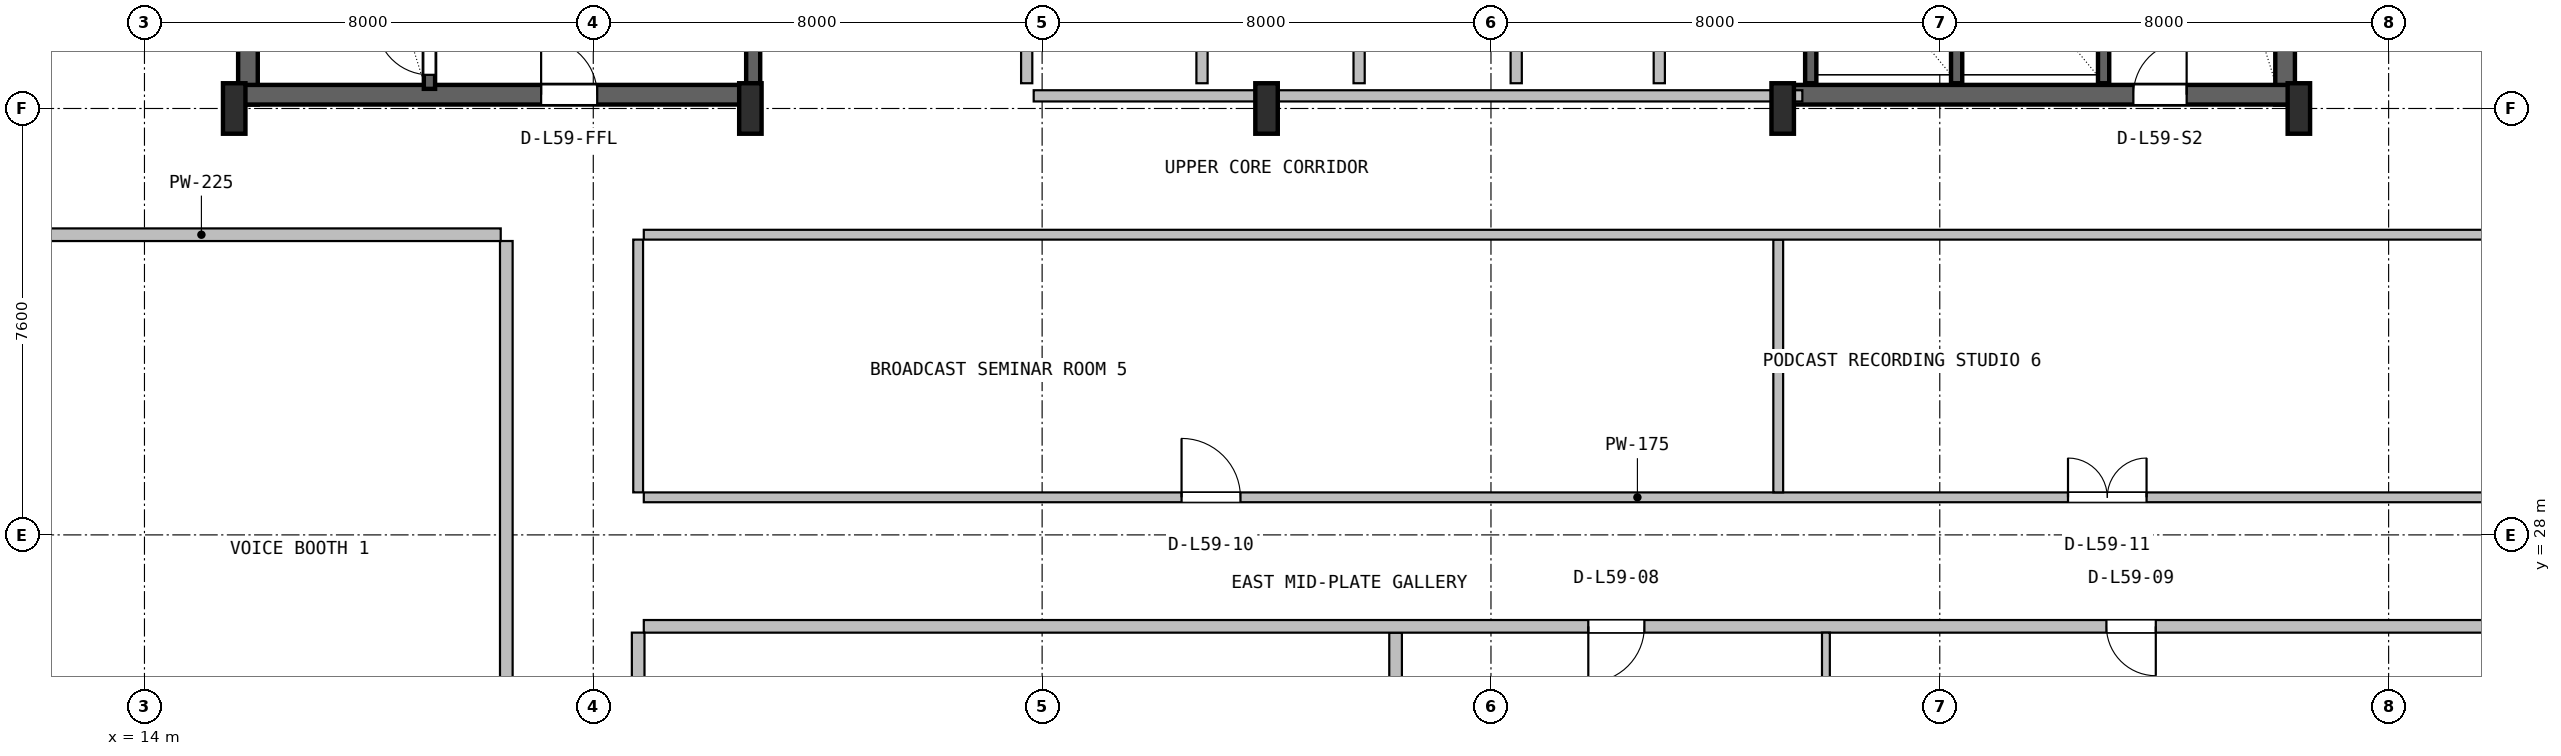
"""IFC4 building model, lengths in metres.
Left out: names, types, materials, properties, quantities, classifications, styles, units other than length and angle.
Written with IfcOpenShell. Run it as: python <this file> out.ifc"""

import sys

from ifc_helpers import new_model, si_unit, direction, frame, frame_2d, origin, origin_2d, place, context, subcontext, project, spatial, rectangle, i_section, extrude, source, transform, mapped, element, fill, save


model = new_model("IFC4")
c1 = context("Model", 3, precision=1e-05, world=origin(), true_north=direction((0.0, 1.0)))
c2 = subcontext(c1, "Body", "Model", "MODEL_VIEW")
j1 = project(units=[si_unit("LENGTHUNIT", "METRE"), si_unit("PLANEANGLEUNIT", "RADIAN")], contexts=[c1])
p1 = place(None, origin())
s1 = spatial("IfcSite", under=j1, at=p1, CompositionType="ELEMENT")
p2 = place(p1, origin())
s2 = spatial("IfcBuilding", under=s1, at=p2, CompositionType="ELEMENT")
p3 = place(p2, frame((0.0, 0.0, 239.4)))
s3 = spatial("IfcBuildingStorey", under=s2, at=p3, CompositionType="ELEMENT", Elevation=239.4)
for number, where, z_axis, x_axis in (
    (1, (15.845, 35.67, 0.0), (0.0, 0.0, 1.0), (0.0, 1.0, 0.0)),
    (2, (52.155, 35.67, 0.0), (0.0, 0.0, 1.0), (0.0, 1.0, 0.0)),
):
    element("IfcWall", number, at=place(p3, frame(where, z_axis=z_axis, x_axis=x_axis)), inside=s3, PredefinedType="SHEAR", context=c2, shape_type="SweptSolid", body=[
        extrude(rectangle(XDim=11.13, YDim=0.35, at=frame_2d((5.565, 0.0))), origin(), (0.0, 0.0, 1.0), 3.55),
    ])
p4 = place(p3, frame((15.67, 35.845, 0.0), z_axis=(0.0, 0.0, 1.0), x_axis=(1.0, 0.0, 0.0)))
e3 = element("IfcWall", 3, at=p4, inside=s3, PredefinedType="SHEAR", context=c2, shape_type="SweptSolid", body=[
    extrude(rectangle(XDim=9.13, YDim=0.35, at=frame_2d((4.565, 0.0))), origin(), (0.0, 0.0, 1.0), 3.55),
])
p5 = place(p4, frame((5.4, 0.0, 0.0)))
e4 = element("IfcOpeningElement", 4, at=p5, cuts=e3, PredefinedType="OPENING", context=c2, shape_type="SweptSolid", body=[
    extrude(rectangle(XDim=1.0, YDim=2.1, at=frame_2d((0.5, 1.05))), frame((0.0, 0.185, 0.0), z_axis=(0.0, -1.0, 0.0), x_axis=(1.0, 0.0, 0.0)), (0.0, 0.0, 1.0), 0.37),
])
p6 = place(p3, frame((43.2, 35.845, 0.0), z_axis=(0.0, 0.0, 1.0), x_axis=(1.0, 0.0, 0.0)))
e5 = element("IfcWall", 5, at=p6, inside=s3, PredefinedType="SHEAR", context=c2, shape_type="SweptSolid", body=[
    extrude(rectangle(XDim=9.13, YDim=0.35, at=frame_2d((4.565, 0.0))), origin(), (0.0, 0.0, 1.0), 3.55),
])
p7 = place(p6, frame((6.25, 0.0, 0.0)))
e6 = element("IfcOpeningElement", 6, at=p7, cuts=e5, PredefinedType="OPENING", context=c2, shape_type="SweptSolid", body=[
    extrude(rectangle(XDim=0.95, YDim=2.1, at=frame_2d((0.475, 1.05))), frame((0.0, 0.185, 0.0), z_axis=(0.0, -1.0, 0.0), x_axis=(1.0, 0.0, 0.0)), (0.0, 0.0, 1.0), 0.37),
])
m1 = source(origin(), c2, "Body", "SweptSolid", [
    extrude(i_section(OverallWidth=0.4, OverallDepth=0.9, WebThickness=0.016, FlangeThickness=0.028, FilletRadius=0.016, at=origin_2d()), origin(), (0.0, 0.0, 1.0), 3.8),
])
for number, where, z_axis, x_axis in (
    (7, (15.6, 35.6, 0.0), (0.0, 0.0, 1.0), (1.0, 0.0, 0.0)),
    (8, (24.8, 35.6, 0.0), (0.0, 0.0, 1.0), (1.0, 0.0, 0.0)),
    (9, (34.0, 35.6, 0.0), (0.0, 0.0, 1.0), (1.0, 0.0, 0.0)),
    (10, (43.2, 35.6, 0.0), (0.0, 0.0, 1.0), (1.0, 0.0, 0.0)),
    (11, (52.4, 35.6, 0.0), (0.0, 0.0, 1.0), (1.0, 0.0, 0.0)),
):
    element("IfcColumn", number, at=place(p3, frame(where, z_axis=z_axis, x_axis=x_axis)), inside=s3, PredefinedType="COLUMN", context=c2, shape_type="MappedRepresentation", body=[
        mapped(m1, transform((0.0, 0.0, 0.0), x_axis=(1.0, 0.0, 0.0), y_axis=(0.0, 1.0, 0.0), z_axis=(0.0, 0.0, 1.0), scale=1.0)),
    ])
p8 = place(p3, frame((19.08, 35.95, 0.0), z_axis=(0.0, 0.0, 1.0), x_axis=(0.0, 1.0, 0.0)))
e12 = element("IfcWall", 12, at=p8, inside=s3, PredefinedType="SHEAR", context=c2, shape_type="SweptSolid", body=[
    extrude(rectangle(XDim=9.65, YDim=0.2, at=frame_2d((4.825, 0.0))), origin(), (0.0, 0.0, 1.0), 3.55),
])
p9 = place(p8, frame((0.25, 0.0, 0.0)))
e13 = element("IfcOpeningElement", 13, at=p9, cuts=e12, PredefinedType="OPENING", context=c2, shape_type="SweptSolid", body=[
    extrude(rectangle(XDim=0.95, YDim=2.1, at=frame_2d((0.475, 1.05))), frame((0.0, 0.11, 0.0), z_axis=(0.0, -1.0, 0.0), x_axis=(1.0, 0.0, 0.0)), (0.0, 0.0, 1.0), 0.22),
])
p10 = place(p3, frame((24.85, 36.05, 0.0), z_axis=(0.0, 0.0, 1.0), x_axis=(0.0, 1.0, 0.0)))
e14 = element("IfcWall", 14, at=p10, inside=s3, PredefinedType="SHEAR", context=c2, shape_type="SweptSolid", body=[
    extrude(rectangle(XDim=10.45, YDim=0.25, at=frame_2d((5.225, 0.0))), origin(), (0.0, 0.0, 1.0), 3.55),
])
p11 = place(p3, frame((48.92, 36.05, 0.0), z_axis=(0.0, 0.0, 1.0), x_axis=(0.0, 1.0, 0.0)))
e15 = element("IfcWall", 15, at=p11, inside=s3, PredefinedType="SHEAR", context=c2, shape_type="SweptSolid", body=[
    extrude(rectangle(XDim=10.5, YDim=0.2, at=frame_2d((5.25, 0.0))), origin(), (0.0, 0.0, 1.0), 3.55),
])
for number, where, z_axis, x_axis in (
    (16, (43.7, 36.05, 0.0), (0.0, 0.0, 1.0), (0.0, 1.0, 0.0)),
    (17, (46.3, 36.05, 0.0), (0.0, 0.0, 1.0), (0.0, 1.0, 0.0)),
):
    element("IfcWall", number, at=place(p3, frame(where, z_axis=z_axis, x_axis=x_axis)), inside=s3, PredefinedType="SHEAR", context=c2, shape_type="SweptSolid", body=[
        extrude(rectangle(XDim=3.05, YDim=0.2, at=frame_2d((1.525, 0.0))), origin(), (0.0, 0.0, 1.0), 3.55),
    ])
p12 = place(p3, frame((29.85, 35.825, 0.0), z_axis=(0.0, 0.0, 1.0), x_axis=(1.0, 0.0, 0.0)))
e18 = element("IfcWall", 18, at=p12, inside=s3, PredefinedType="SOLIDWALL", context=c2, shape_type="SweptSolid", body=[
    extrude(rectangle(XDim=13.7, YDim=0.2, at=frame_2d((6.85, 0.0))), origin(), (0.0, 0.0, 1.0), 2.575),
])
for number, where, z_axis, x_axis in (
    (19, (32.85, 36.05, 0.0), (0.0, 0.0, 1.0), (0.0, 1.0, 0.0)),
    (20, (29.725, 36.05, 0.0), (0.0, 0.0, 1.0), (0.0, 1.0, 0.0)),
    (21, (35.65, 36.05, 0.0), (0.0, 0.0, 1.0), (0.0, 1.0, 0.0)),
    (22, (38.45, 36.05, 0.0), (0.0, 0.0, 1.0), (0.0, 1.0, 0.0)),
):
    element("IfcWall", number, at=place(p3, frame(where, z_axis=z_axis, x_axis=x_axis)), inside=s3, PredefinedType="PLUMBINGWALL", context=c2, shape_type="SweptSolid", body=[
        extrude(rectangle(XDim=3.1, YDim=0.2, at=frame_2d((1.55, 0.0))), origin(), (0.0, 0.0, 1.0), 3.53),
    ])
p13 = place(p3, frame((41.0, 36.05, 0.0), z_axis=(0.0, 0.0, 1.0), x_axis=(0.0, 1.0, 0.0)))
e23 = element("IfcWall", 23, at=p13, inside=s3, PredefinedType="SOLIDWALL", context=c2, shape_type="SweptSolid", body=[
    extrude(rectangle(XDim=3.1, YDim=0.2, at=frame_2d((1.55, 0.0))), origin(), (0.0, 0.0, 1.0), 3.53),
])
p14 = place(p3, frame((20.45, 10.38, 0.0), z_axis=(0.0, 0.0, 1.0), x_axis=(0.0, 1.0, 0.0)))
e24 = element("IfcWall", 24, at=p14, inside=s3, PredefinedType="PARTITIONING", context=c2, shape_type="SweptSolid", body=[
    extrude(rectangle(XDim=22.858, YDim=0.225, at=frame_2d((11.429, 0.0))), origin(), (0.0, 0.0, 1.0), 3.171),
])
p15 = place(p14, frame((11.184, 0.0, 0.0)))
e25 = element("IfcOpeningElement", 25, at=p15, cuts=e24, PredefinedType="OPENING", context=c2, shape_type="SweptSolid", body=[
    extrude(rectangle(XDim=1.4, YDim=2.12, at=frame_2d((0.7, 1.06))), frame((0.0, 0.123, 0.0), z_axis=(0.0, -1.0, 0.0), x_axis=(1.0, 0.0, 0.0)), (0.0, 0.0, 1.0), 0.245),
])
p16 = place(p3, frame((9.68, 33.35, 0.0), z_axis=(0.0, 0.0, 1.0), x_axis=(1.0, 0.0, 0.0)))
e26 = element("IfcWall", 26, at=p16, inside=s3, PredefinedType="PARTITIONING", context=c2, shape_type="SweptSolid", body=[
    extrude(rectangle(XDim=10.67, YDim=0.225, at=frame_2d((5.335, 0.0))), origin(), (0.0, 0.0, 1.0), 3.171),
])
p17 = place(p3, frame((36.3, 10.38, 0.0), z_axis=(0.0, 0.0, 1.0), x_axis=(0.0, 1.0, 0.0)))
e27 = element("IfcWall", 27, at=p17, inside=s3, PredefinedType="PARTITIONING", context=c2, shape_type="SweptSolid", body=[
    extrude(rectangle(XDim=15.878, YDim=0.225, at=frame_2d((7.939, 0.0))), origin(), (0.0, 0.0, 1.0), 2.908),
])
p18 = place(p3, frame((22.9, 26.37, 0.0), z_axis=(0.0, 0.0, 1.0), x_axis=(1.0, 0.0, 0.0)))
e28 = element("IfcWall", 28, at=p18, inside=s3, PredefinedType="PARTITIONING", context=c2, shape_type="SweptSolid", body=[
    extrude(rectangle(XDim=35.42, YDim=0.225, at=frame_2d((17.71, 0.0))), origin(), (0.0, 0.0, 1.0), 2.908),
])
p19 = place(p18, frame((16.835, 0.0, 0.0)))
e29 = element("IfcOpeningElement", 29, at=p19, cuts=e28, PredefinedType="OPENING", context=c2, shape_type="SweptSolid", body=[
    extrude(rectangle(XDim=1.0, YDim=2.1, at=frame_2d((0.5, 1.05))), frame((0.0, 0.123, 0.0), z_axis=(0.0, -1.0, 0.0), x_axis=(1.0, 0.0, 0.0)), (0.0, 0.0, 1.0), 0.245),
])
p20 = place(p18, frame((26.07, 0.0, 0.0)))
e30 = element("IfcOpeningElement", 30, at=p20, cuts=e28, PredefinedType="OPENING", context=c2, shape_type="SweptSolid", body=[
    extrude(rectangle(XDim=0.88, YDim=2.06, at=frame_2d((0.44, 1.03))), frame((0.0, 0.123, 0.0), z_axis=(0.0, -1.0, 0.0), x_axis=(1.0, 0.0, 0.0)), (0.0, 0.0, 1.0), 0.245),
])
p21 = place(p3, frame((22.8, 10.38, 0.0), z_axis=(0.0, 0.0, 1.0), x_axis=(0.0, 1.0, 0.0)))
e31 = element("IfcWall", 31, at=p21, inside=s3, PredefinedType="PARTITIONING", context=c2, shape_type="SweptSolid", body=[
    extrude(rectangle(XDim=15.878, YDim=0.225, at=frame_2d((7.939, 0.0))), origin(), (0.0, 0.0, 1.0), 3.171),
])
p22 = place(p21, frame((7.934, 0.0, 0.0)))
e32 = element("IfcOpeningElement", 32, at=p22, cuts=e31, PredefinedType="OPENING", context=c2, shape_type="SweptSolid", body=[
    extrude(rectangle(XDim=0.92, YDim=2.08, at=frame_2d((0.46, 1.04))), frame((0.0, 0.123, 0.0), z_axis=(0.0, -1.0, 0.0), x_axis=(1.0, 0.0, 0.0)), (0.0, 0.0, 1.0), 0.245),
])
p23 = place(p3, frame((43.97, 11.55, 0.0), z_axis=(0.0, 0.0, 1.0), x_axis=(0.0, 1.0, 0.0)))
e33 = element("IfcWall", 33, at=p23, inside=s3, PredefinedType="PARTITIONING", context=c2, shape_type="SweptSolid", body=[
    extrude(rectangle(XDim=14.708, YDim=0.14, at=frame_2d((7.354, 0.0))), origin(), (0.0, 0.0, 1.0), 2.908),
])
p24 = place(p3, frame((22.9, 28.67, 0.0), z_axis=(0.0, 0.0, 1.0), x_axis=(1.0, 0.0, 0.0)))
e34 = element("IfcWall", 34, at=p24, inside=s3, PredefinedType="PARTITIONING", context=c2, shape_type="SweptSolid", body=[
    extrude(rectangle(XDim=35.42, YDim=0.175, at=frame_2d((17.71, 0.0))), origin(), (0.0, 0.0, 1.0), 2.908),
])
p25 = place(p24, frame((9.585, 0.0, 0.0)))
e35 = element("IfcOpeningElement", 35, at=p25, cuts=e34, PredefinedType="OPENING", context=c2, shape_type="SweptSolid", body=[
    extrude(rectangle(XDim=1.05, YDim=2.1, at=frame_2d((0.525, 1.05))), frame((0.0, 0.098, 0.0), z_axis=(0.0, -1.0, 0.0), x_axis=(1.0, 0.0, 0.0)), (0.0, 0.0, 1.0), 0.195),
])
p26 = place(p24, frame((25.385, 0.0, 0.0)))
e36 = element("IfcOpeningElement", 36, at=p26, cuts=e34, PredefinedType="OPENING", context=c2, shape_type="SweptSolid", body=[
    extrude(rectangle(XDim=1.4, YDim=2.12, at=frame_2d((0.7, 1.06))), frame((0.0, 0.098, 0.0), z_axis=(0.0, -1.0, 0.0), x_axis=(1.0, 0.0, 0.0)), (0.0, 0.0, 1.0), 0.195),
])
p27 = place(p3, frame((43.12, 28.758, 0.0), z_axis=(0.0, 0.0, 1.0), x_axis=(0.0, 1.0, 0.0)))
e37 = element("IfcWall", 37, at=p27, inside=s3, PredefinedType="PARTITIONING", context=c2, shape_type="SweptSolid", body=[
    extrude(rectangle(XDim=4.505, YDim=0.175, at=frame_2d((2.252, 0.0))), origin(), (0.0, 0.0, 1.0), 2.908),
])
p28 = place(p3, frame((22.9, 33.35, 0.0), z_axis=(0.0, 0.0, 1.0), x_axis=(1.0, 0.0, 0.0)))
e38 = element("IfcWall", 38, at=p28, inside=s3, PredefinedType="PARTITIONING", context=c2, shape_type="SweptSolid", body=[
    extrude(rectangle(XDim=35.42, YDim=0.175, at=frame_2d((17.71, 0.0))), origin(), (0.0, 0.0, 1.0), 2.908),
])
p29 = place(p3, frame((22.8, 28.758, 0.0), z_axis=(0.0, 0.0, 1.0), x_axis=(0.0, 1.0, 0.0)))
e39 = element("IfcWall", 39, at=p29, inside=s3, PredefinedType="PARTITIONING", context=c2, shape_type="SweptSolid", body=[
    extrude(rectangle(XDim=4.505, YDim=0.175, at=frame_2d((2.252, 0.0))), origin(), (0.0, 0.0, 1.0), 3.53),
])
m2 = source(origin(), c2, "Body", "SweptSolid", [
    extrude(rectangle(XDim=0.95, YDim=2.1, at=frame_2d((0.475, 1.05))), frame((0.0, 0.025, 0.0), z_axis=(0.0, -1.0, 0.0), x_axis=(1.0, 0.0, 0.0)), (0.0, 0.0, 1.0), 0.05),
])
p30 = place(p9, origin())
e40 = element("IfcDoor", 40, at=p30, inside=s3, OperationType="SINGLE_SWING_RIGHT", PredefinedType="DOOR", context=c2, shape_type="MappedRepresentation", body=[
    mapped(m2, transform((0.0, 0.0, 0.0), x_axis=(1.0, 0.0, 0.0), y_axis=(0.0, 1.0, 0.0), z_axis=(0.0, 0.0, 1.0), scale=1.0)),
])
fill(e13, e40)
m3 = source(origin(), c2, "Body", "SweptSolid", [
    extrude(rectangle(XDim=1.0, YDim=2.1, at=frame_2d((0.5, 1.05))), frame((0.0, 0.025, 0.0), z_axis=(0.0, -1.0, 0.0), x_axis=(1.0, 0.0, 0.0)), (0.0, 0.0, 1.0), 0.05),
])
p31 = place(p5, origin())
e41 = element("IfcDoor", 41, at=p31, inside=s3, OperationType="SINGLE_SWING_LEFT", PredefinedType="DOOR", context=c2, shape_type="MappedRepresentation", body=[
    mapped(m3, transform((0.0, 0.0, 0.0), x_axis=(1.0, 0.0, 0.0), y_axis=(0.0, 1.0, 0.0), z_axis=(0.0, 0.0, 1.0), scale=1.0)),
])
fill(e4, e41)
p32 = place(p7, origin())
e42 = element("IfcDoor", 42, at=p32, inside=s3, OperationType="SINGLE_SWING_RIGHT", PredefinedType="DOOR", context=c2, shape_type="MappedRepresentation", body=[
    mapped(m2, transform((0.0, 0.0, 0.0), x_axis=(1.0, 0.0, 0.0), y_axis=(0.0, 1.0, 0.0), z_axis=(0.0, 0.0, 1.0), scale=1.0)),
])
fill(e6, e42)
m4 = source(origin(), c2, "Body", "SweptSolid", [
    extrude(rectangle(XDim=1.0, YDim=2.1, at=frame_2d((0.5, 1.05))), frame((0.0, 0.025, 0.0), z_axis=(0.0, -1.0, 0.0), x_axis=(1.0, 0.0, 0.0)), (0.0, 0.0, 1.0), 0.05),
])
p33 = place(p19, frame((1.0, 0.0, 0.0), z_axis=(0.0, 0.0, 1.0), x_axis=(-1.0, 0.0, 0.0)))
e43 = element("IfcDoor", 43, at=p33, inside=s3, OperationType="SINGLE_SWING_LEFT", PredefinedType="DOOR", context=c2, shape_type="MappedRepresentation", body=[
    mapped(m4, transform((0.0, 0.0, 0.0), x_axis=(1.0, 0.0, 0.0), y_axis=(0.0, 1.0, 0.0), z_axis=(0.0, 0.0, 1.0), scale=1.0)),
])
fill(e29, e43)
m5 = source(origin(), c2, "Body", "SweptSolid", [
    extrude(rectangle(XDim=0.88, YDim=2.06, at=frame_2d((0.44, 1.03))), frame((0.0, 0.025, 0.0), z_axis=(0.0, -1.0, 0.0), x_axis=(1.0, 0.0, 0.0)), (0.0, 0.0, 1.0), 0.05),
])
p34 = place(p20, frame((0.88, 0.0, 0.0), z_axis=(0.0, 0.0, 1.0), x_axis=(-1.0, 0.0, 0.0)))
e44 = element("IfcDoor", 44, at=p34, inside=s3, OperationType="SINGLE_SWING_RIGHT", PredefinedType="DOOR", context=c2, shape_type="MappedRepresentation", body=[
    mapped(m5, transform((0.0, 0.0, 0.0), x_axis=(1.0, 0.0, 0.0), y_axis=(0.0, 1.0, 0.0), z_axis=(0.0, 0.0, 1.0), scale=1.0)),
])
fill(e30, e44)
m6 = source(origin(), c2, "Body", "SweptSolid", [
    extrude(rectangle(XDim=1.05, YDim=2.1, at=frame_2d((0.525, 1.05))), frame((0.0, 0.025, 0.0), z_axis=(0.0, -1.0, 0.0), x_axis=(1.0, 0.0, 0.0)), (0.0, 0.0, 1.0), 0.05),
])
p35 = place(p25, origin())
e45 = element("IfcDoor", 45, at=p35, inside=s3, OperationType="SINGLE_SWING_LEFT", PredefinedType="DOOR", context=c2, shape_type="MappedRepresentation", body=[
    mapped(m6, transform((0.0, 0.0, 0.0), x_axis=(1.0, 0.0, 0.0), y_axis=(0.0, 1.0, 0.0), z_axis=(0.0, 0.0, 1.0), scale=1.0)),
])
fill(e35, e45)
m7 = source(origin(), c2, "Body", "SweptSolid", [
    extrude(rectangle(XDim=1.4, YDim=2.12, at=frame_2d((0.7, 1.06))), frame((0.0, 0.025, 0.0), z_axis=(0.0, -1.0, 0.0), x_axis=(1.0, 0.0, 0.0)), (0.0, 0.0, 1.0), 0.05),
])
p36 = place(p26, origin())
e46 = element("IfcDoor", 46, at=p36, inside=s3, OperationType="DOUBLE_DOOR_SINGLE_SWING", PredefinedType="DOOR", context=c2, shape_type="MappedRepresentation", body=[
    mapped(m7, transform((0.0, 0.0, 0.0), x_axis=(1.0, 0.0, 0.0), y_axis=(0.0, 1.0, 0.0), z_axis=(0.0, 0.0, 1.0), scale=1.0)),
])
fill(e36, e46)
save(model, sys.argv[1])
